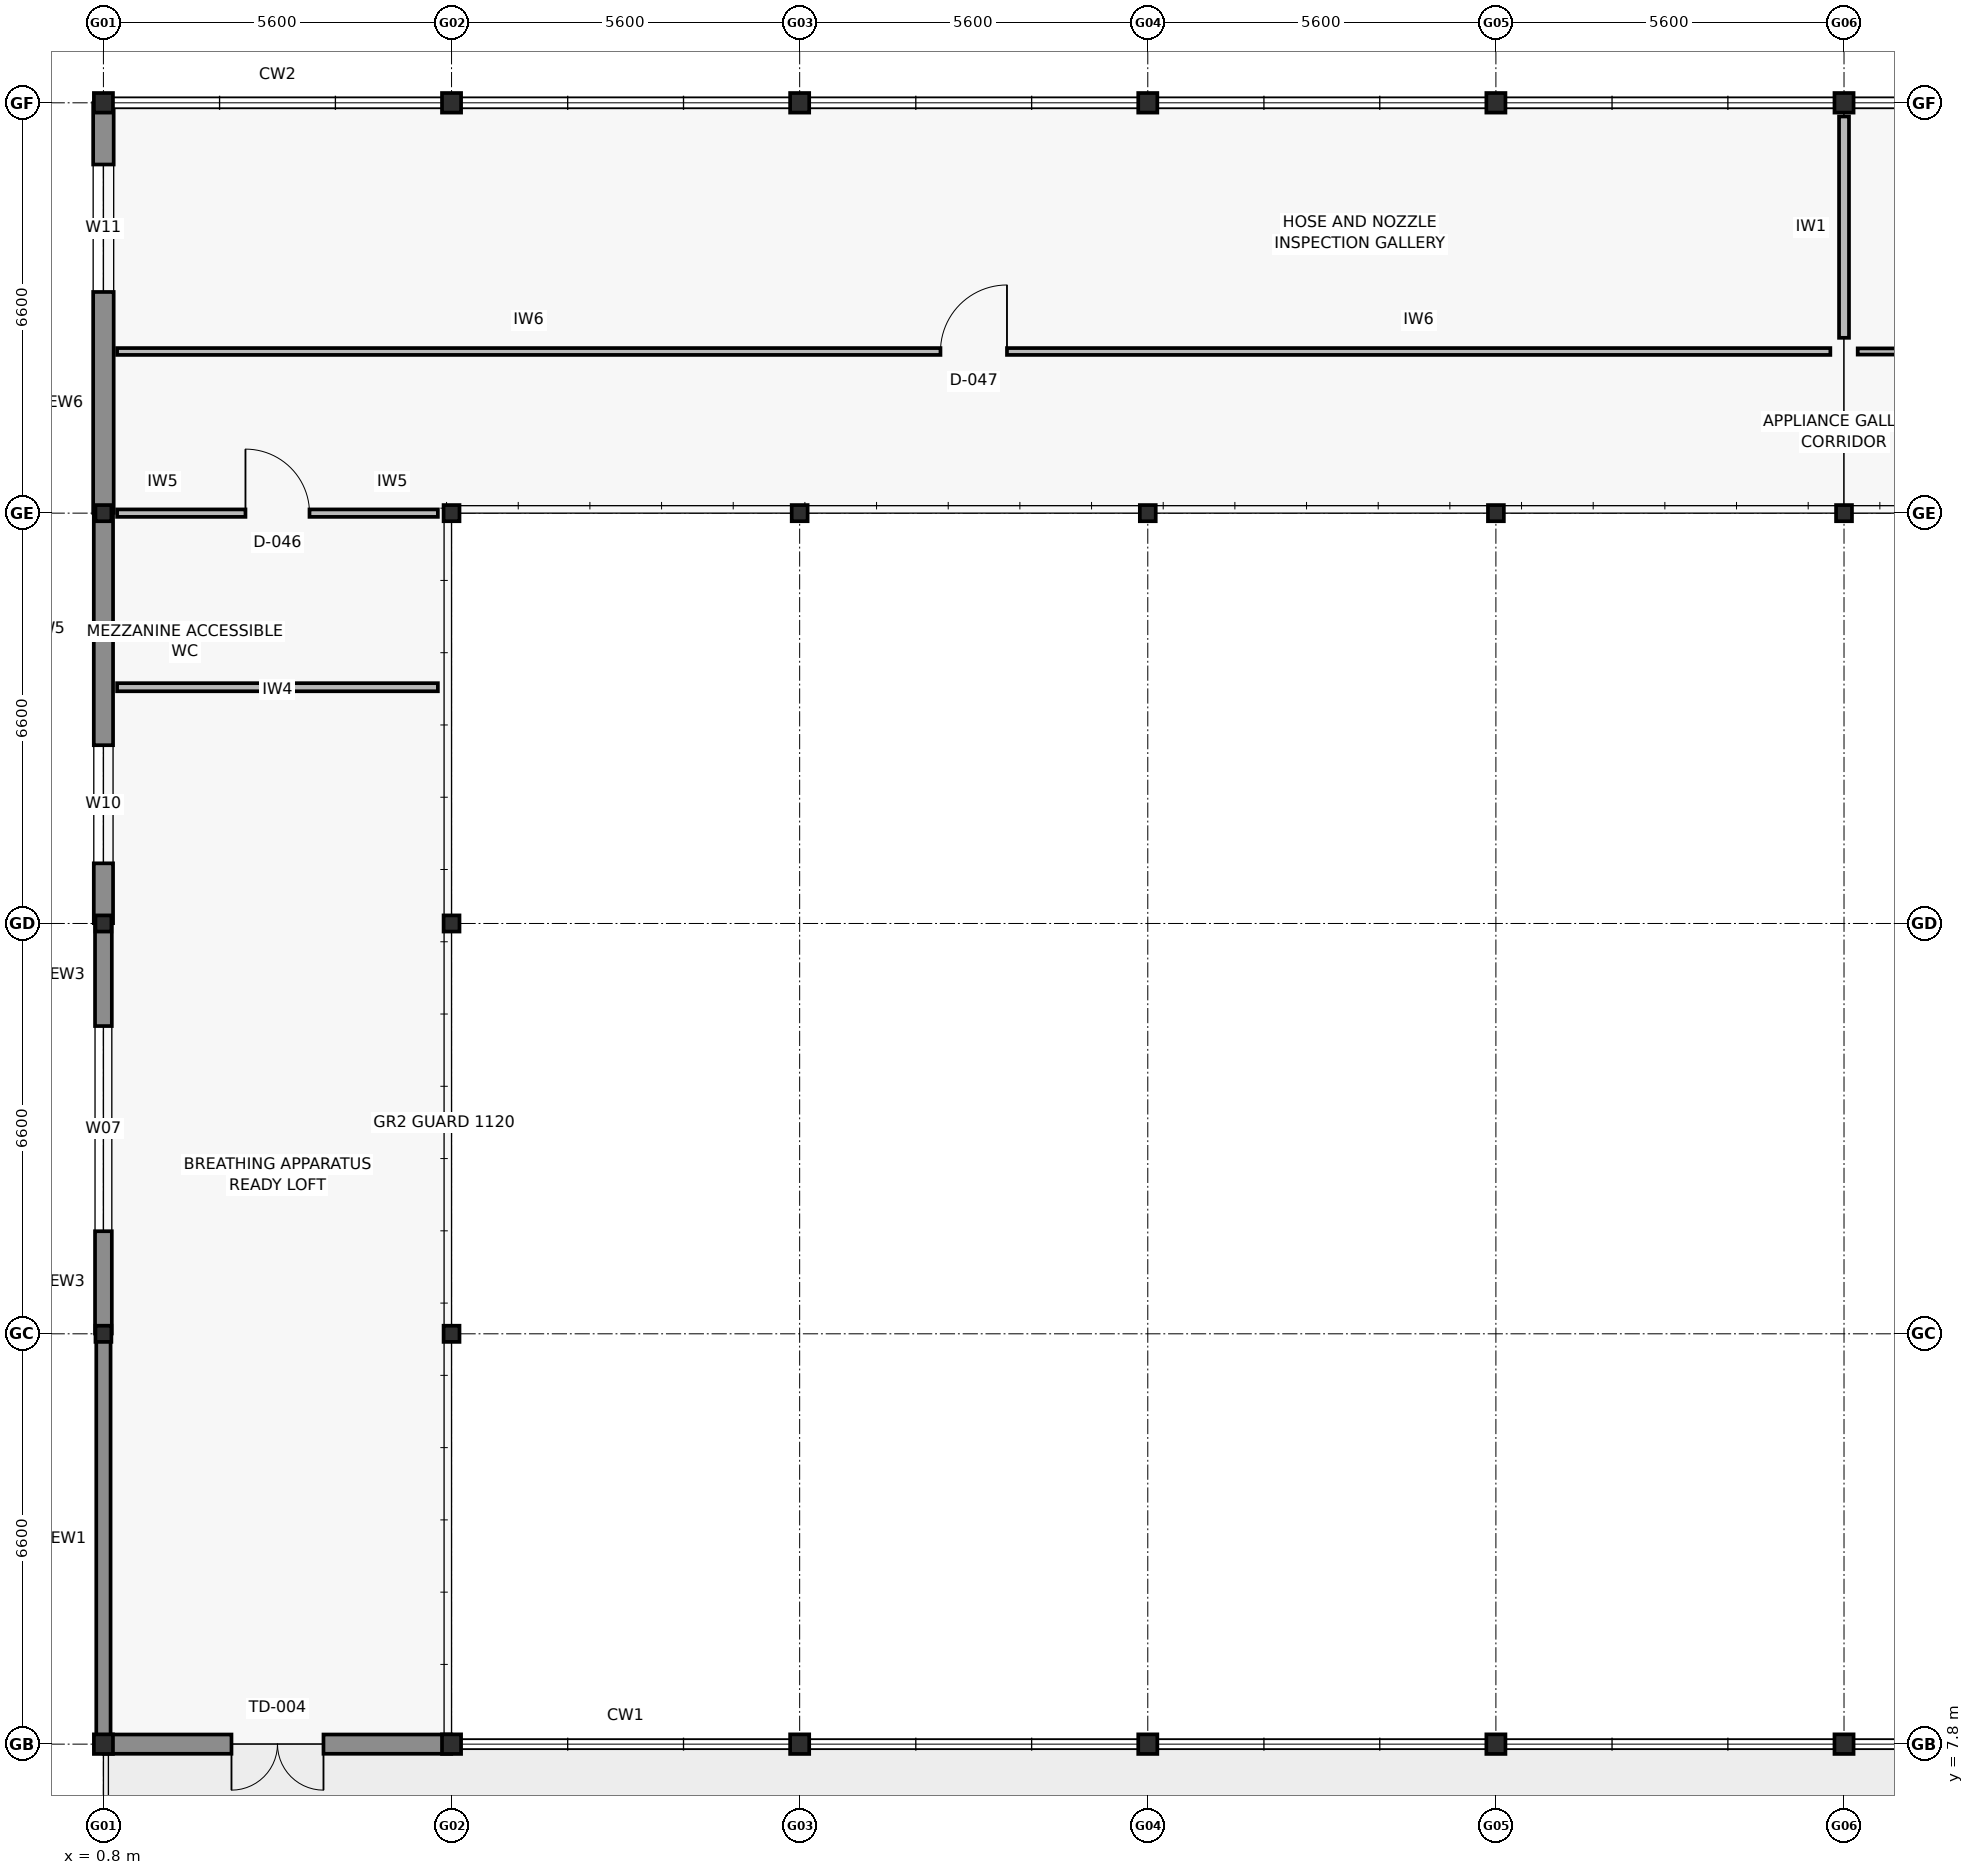
"""IFC4 building model, lengths in metres.
Left out: names, types, materials, properties, quantities, classifications, styles, units other than length and angle.
Written with IfcOpenShell. Run it as: python <this file> out.ifc"""

import sys

from ifc_helpers import new_model, si_unit, direction, frame, frame_2d, origin, origin_2d, place, context, subcontext, project, spatial, rectangle, i_section, extrude, element, fill, save


model = new_model("IFC4")
c1 = context("Model", 3, precision=1e-05, world=origin(), true_north=direction((0.0, 1.0)))
c2 = subcontext(c1, "Body", "Model", "MODEL_VIEW")
j1 = project(units=[si_unit("LENGTHUNIT", "METRE"), si_unit("PLANEANGLEUNIT", "RADIAN")], contexts=[c1])
p1 = place(None, origin())
s1 = spatial("IfcSite", under=j1, at=p1, CompositionType="ELEMENT")
p2 = place(p1, origin())
s2 = spatial("IfcBuilding", under=s1, at=p2, CompositionType="ELEMENT")
p3 = place(p2, frame((0.0, 0.0, 5.4)))
s3 = spatial("IfcBuildingStorey", under=s2, at=p3, CompositionType="ELEMENT", Elevation=5.4)
p4 = place(p3, frame((0.8, 7.8, 0.0), z_axis=(0.0, 0.0, 1.0), x_axis=(1.0, 0.0, 0.0)))
e1 = element("IfcColumn", 1, at=p4, inside=s3, PredefinedType="COLUMN", context=c2, shape_type="SweptSolid", body=[
    extrude(i_section(OverallWidth=0.307, OverallDepth=0.315, WebThickness=0.012, FlangeThickness=0.019, FilletRadius=0.017, at=origin_2d()), origin(), (0.0, 0.0, 1.0), 4.2),
])
for number, where, z_axis, x_axis in (
    (2, (0.8, 14.4, 0.0), (0.0, 0.0, 1.0), (1.0, 0.0, 0.0)),
    (3, (0.8, 21.0, 0.0), (0.0, 0.0, 1.0), (1.0, 0.0, 0.0)),
    (4, (0.8, 27.6, 0.0), (0.0, 0.0, 1.0), (1.0, 0.0, 0.0)),
):
    element("IfcColumn", number, at=place(p3, frame(where, z_axis=z_axis, x_axis=x_axis)), inside=s3, PredefinedType="COLUMN", context=c2, shape_type="SweptSolid", body=[
        extrude(i_section(OverallWidth=0.256, OverallDepth=0.26, WebThickness=0.01, FlangeThickness=0.017, FilletRadius=0.013, at=origin_2d()), origin(), (0.0, 0.0, 1.0), 4.2),
    ])
for number, where, z_axis, x_axis in (
    (5, (0.8, 34.2, 0.0), (0.0, 0.0, 1.0), (1.0, 0.0, 0.0)),
    (6, (6.4, 7.8, 0.0), (0.0, 0.0, 1.0), (1.0, 0.0, 0.0)),
):
    element("IfcColumn", number, at=place(p3, frame(where, z_axis=z_axis, x_axis=x_axis)), inside=s3, PredefinedType="COLUMN", context=c2, shape_type="SweptSolid", body=[
        extrude(i_section(OverallWidth=0.307, OverallDepth=0.315, WebThickness=0.012, FlangeThickness=0.019, FilletRadius=0.017, at=origin_2d()), origin(), (0.0, 0.0, 1.0), 4.2),
    ])
for number, where, z_axis, x_axis in (
    (7, (6.4, 14.4, 0.0), (0.0, 0.0, 1.0), (1.0, 0.0, 0.0)),
    (8, (6.4, 21.0, 0.0), (0.0, 0.0, 1.0), (1.0, 0.0, 0.0)),
    (9, (6.4, 27.6, 0.0), (0.0, 0.0, 1.0), (1.0, 0.0, 0.0)),
):
    element("IfcColumn", number, at=place(p3, frame(where, z_axis=z_axis, x_axis=x_axis)), inside=s3, PredefinedType="COLUMN", context=c2, shape_type="SweptSolid", body=[
        extrude(i_section(OverallWidth=0.256, OverallDepth=0.26, WebThickness=0.01, FlangeThickness=0.017, FilletRadius=0.013, at=origin_2d()), origin(), (0.0, 0.0, 1.0), 4.2),
    ])
for number, where, z_axis, x_axis in (
    (10, (6.4, 34.2, 0.0), (0.0, 0.0, 1.0), (1.0, 0.0, 0.0)),
    (11, (12.0, 7.8, 0.0), (0.0, 0.0, 1.0), (1.0, 0.0, 0.0)),
):
    element("IfcColumn", number, at=place(p3, frame(where, z_axis=z_axis, x_axis=x_axis)), inside=s3, PredefinedType="COLUMN", context=c2, shape_type="SweptSolid", body=[
        extrude(i_section(OverallWidth=0.307, OverallDepth=0.315, WebThickness=0.012, FlangeThickness=0.019, FilletRadius=0.017, at=origin_2d()), origin(), (0.0, 0.0, 1.0), 4.2),
    ])
p5 = place(p3, frame((12.0, 27.6, 0.0), z_axis=(0.0, 0.0, 1.0), x_axis=(1.0, 0.0, 0.0)))
e12 = element("IfcColumn", 12, at=p5, inside=s3, PredefinedType="COLUMN", context=c2, shape_type="SweptSolid", body=[
    extrude(i_section(OverallWidth=0.256, OverallDepth=0.26, WebThickness=0.01, FlangeThickness=0.017, FilletRadius=0.013, at=origin_2d()), origin(), (0.0, 0.0, 1.0), 4.2),
])
for number, where, z_axis, x_axis in (
    (13, (12.0, 34.2, 0.0), (0.0, 0.0, 1.0), (1.0, 0.0, 0.0)),
    (14, (17.6, 7.8, 0.0), (0.0, 0.0, 1.0), (1.0, 0.0, 0.0)),
):
    element("IfcColumn", number, at=place(p3, frame(where, z_axis=z_axis, x_axis=x_axis)), inside=s3, PredefinedType="COLUMN", context=c2, shape_type="SweptSolid", body=[
        extrude(i_section(OverallWidth=0.307, OverallDepth=0.315, WebThickness=0.012, FlangeThickness=0.019, FilletRadius=0.017, at=origin_2d()), origin(), (0.0, 0.0, 1.0), 4.2),
    ])
p6 = place(p3, frame((17.6, 27.6, 0.0), z_axis=(0.0, 0.0, 1.0), x_axis=(1.0, 0.0, 0.0)))
e15 = element("IfcColumn", 15, at=p6, inside=s3, PredefinedType="COLUMN", context=c2, shape_type="SweptSolid", body=[
    extrude(i_section(OverallWidth=0.256, OverallDepth=0.26, WebThickness=0.01, FlangeThickness=0.017, FilletRadius=0.013, at=origin_2d()), origin(), (0.0, 0.0, 1.0), 4.2),
])
for number, where, z_axis, x_axis in (
    (16, (17.6, 34.2, 0.0), (0.0, 0.0, 1.0), (1.0, 0.0, 0.0)),
    (17, (23.2, 7.8, 0.0), (0.0, 0.0, 1.0), (1.0, 0.0, 0.0)),
):
    element("IfcColumn", number, at=place(p3, frame(where, z_axis=z_axis, x_axis=x_axis)), inside=s3, PredefinedType="COLUMN", context=c2, shape_type="SweptSolid", body=[
        extrude(i_section(OverallWidth=0.307, OverallDepth=0.315, WebThickness=0.012, FlangeThickness=0.019, FilletRadius=0.017, at=origin_2d()), origin(), (0.0, 0.0, 1.0), 4.2),
    ])
p7 = place(p3, frame((23.2, 27.6, 0.0), z_axis=(0.0, 0.0, 1.0), x_axis=(1.0, 0.0, 0.0)))
e18 = element("IfcColumn", 18, at=p7, inside=s3, PredefinedType="COLUMN", context=c2, shape_type="SweptSolid", body=[
    extrude(i_section(OverallWidth=0.256, OverallDepth=0.26, WebThickness=0.01, FlangeThickness=0.017, FilletRadius=0.013, at=origin_2d()), origin(), (0.0, 0.0, 1.0), 4.2),
])
for number, where, z_axis, x_axis in (
    (19, (23.2, 34.2, 0.0), (0.0, 0.0, 1.0), (1.0, 0.0, 0.0)),
    (20, (28.8, 7.8, 0.0), (0.0, 0.0, 1.0), (1.0, 0.0, 0.0)),
):
    element("IfcColumn", number, at=place(p3, frame(where, z_axis=z_axis, x_axis=x_axis)), inside=s3, PredefinedType="COLUMN", context=c2, shape_type="SweptSolid", body=[
        extrude(i_section(OverallWidth=0.307, OverallDepth=0.315, WebThickness=0.012, FlangeThickness=0.019, FilletRadius=0.017, at=origin_2d()), origin(), (0.0, 0.0, 1.0), 4.2),
    ])
p8 = place(p3, frame((28.8, 27.6, 0.0), z_axis=(0.0, 0.0, 1.0), x_axis=(1.0, 0.0, 0.0)))
e21 = element("IfcColumn", 21, at=p8, inside=s3, PredefinedType="COLUMN", context=c2, shape_type="SweptSolid", body=[
    extrude(i_section(OverallWidth=0.256, OverallDepth=0.26, WebThickness=0.01, FlangeThickness=0.017, FilletRadius=0.013, at=origin_2d()), origin(), (0.0, 0.0, 1.0), 4.2),
])
p9 = place(p3, frame((28.8, 34.2, 0.0), z_axis=(0.0, 0.0, 1.0), x_axis=(1.0, 0.0, 0.0)))
e22 = element("IfcColumn", 22, at=p9, inside=s3, PredefinedType="COLUMN", context=c2, shape_type="SweptSolid", body=[
    extrude(i_section(OverallWidth=0.307, OverallDepth=0.315, WebThickness=0.012, FlangeThickness=0.019, FilletRadius=0.017, at=origin_2d()), origin(), (0.0, 0.0, 1.0), 4.2),
])
p10 = place(p3, frame((6.395, 7.8, 0.0), z_axis=(0.0, 0.0, 1.0), x_axis=(-1.0, 0.0, 0.0)))
e23 = element("IfcWall", 23, at=p10, inside=s3, PredefinedType="SOLIDWALL", context=c2, shape_type="SweptSolid", body=[
    extrude(rectangle(XDim=5.59, YDim=0.31, at=frame_2d((2.795, 0.0))), origin(), (0.0, 0.0, 1.0), 3.32),
])
p11 = place(p10, frame((2.055, 0.0, 0.0)))
e24 = element("IfcOpeningElement", 24, at=p11, cuts=e23, PredefinedType="OPENING", context=c2, shape_type="SweptSolid", body=[
    extrude(rectangle(XDim=1.48, YDim=2.16, at=frame_2d((0.74, 1.08))), frame((0.0, 0.165, 0.0), z_axis=(0.0, -1.0, 0.0), x_axis=(1.0, 0.0, 0.0)), (0.0, 0.0, 1.0), 0.33),
])
p12 = place(p3, frame((0.8, 7.805, 0.0), z_axis=(0.0, 0.0, 1.0), x_axis=(0.0, 1.0, 0.0)))
e25 = element("IfcWall", 25, at=p12, inside=s3, PredefinedType="SOLIDWALL", context=c2, shape_type="SweptSolid", body=[
    extrude(rectangle(XDim=6.59, YDim=0.23, at=frame_2d((3.295, 0.0))), origin(), (0.0, 0.0, 1.0), 3.32),
])
p13 = place(p3, frame((0.8, 14.405, 0.0), z_axis=(0.0, 0.0, 1.0), x_axis=(0.0, 1.0, 0.0)))
e26 = element("IfcWall", 26, at=p13, inside=s3, PredefinedType="SOLIDWALL", context=c2, shape_type="SweptSolid", body=[
    extrude(rectangle(XDim=6.59, YDim=0.27, at=frame_2d((3.295, 0.0))), origin(), (0.0, 0.0, 1.0), 3.32),
])
p14 = place(p13, frame((1.645, 0.0, 0.8)))
e27 = element("IfcOpeningElement", 27, at=p14, cuts=e26, PredefinedType="OPENING", context=c2, shape_type="SweptSolid", body=[
    extrude(rectangle(XDim=3.3, YDim=2.2, at=frame_2d((1.65, 1.1))), frame((0.0, 0.145, 0.0), z_axis=(0.0, -1.0, 0.0), x_axis=(1.0, 0.0, 0.0)), (0.0, 0.0, 1.0), 0.29),
])
p15 = place(p3, frame((0.8, 21.005, 0.0), z_axis=(0.0, 0.0, 1.0), x_axis=(0.0, 1.0, 0.0)))
e28 = element("IfcWall", 28, at=p15, inside=s3, PredefinedType="SOLIDWALL", context=c2, shape_type="SweptSolid", body=[
    extrude(rectangle(XDim=6.59, YDim=0.31, at=frame_2d((3.295, 0.0))), origin(), (0.0, 0.0, 1.0), 3.32),
])
p16 = place(p15, frame((0.962, 0.0, 0.8)))
e29 = element("IfcOpeningElement", 29, at=p16, cuts=e28, PredefinedType="OPENING", context=c2, shape_type="SweptSolid", body=[
    extrude(rectangle(XDim=1.9, YDim=1.8, at=frame_2d((0.95, 0.9))), frame((0.0, 0.165, 0.0), z_axis=(0.0, -1.0, 0.0), x_axis=(1.0, 0.0, 0.0)), (0.0, 0.0, 1.0), 0.33),
])
p17 = place(p3, frame((0.8, 27.605, 0.0), z_axis=(0.0, 0.0, 1.0), x_axis=(0.0, 1.0, 0.0)))
e30 = element("IfcWall", 30, at=p17, inside=s3, PredefinedType="SOLIDWALL", context=c2, shape_type="SweptSolid", body=[
    extrude(rectangle(XDim=6.59, YDim=0.33, at=frame_2d((3.295, 0.0))), origin(), (0.0, 0.0, 1.0), 3.32),
])
p18 = place(p17, frame((3.552, 0.0, 0.8)))
e31 = element("IfcOpeningElement", 31, at=p18, cuts=e30, PredefinedType="OPENING", context=c2, shape_type="SweptSolid", body=[
    extrude(rectangle(XDim=2.05, YDim=1.8, at=frame_2d((1.025, 0.9))), frame((0.0, 0.175, 0.0), z_axis=(0.0, -1.0, 0.0), x_axis=(1.0, 0.0, 0.0)), (0.0, 0.0, 1.0), 0.35),
])
p19 = place(p3, frame((1.02, 24.8, 0.0), z_axis=(0.0, 0.0, 1.0), x_axis=(1.0, 0.0, 0.0)))
e32 = element("IfcWall", 32, at=p19, inside=s3, PredefinedType="PARTITIONING", context=c2, shape_type="SweptSolid", body=[
    extrude(rectangle(XDim=5.16, YDim=0.13, at=frame_2d((2.58, 0.0))), origin(), (0.0, 0.0, 1.0), 3.3),
])
p20 = place(p3, frame((1.02, 27.6, 0.0), z_axis=(0.0, 0.0, 1.0), x_axis=(1.0, 0.0, 0.0)))
e33 = element("IfcWall", 33, at=p20, inside=s3, PredefinedType="PARTITIONING", context=c2, shape_type="SweptSolid", body=[
    extrude(rectangle(XDim=5.16, YDim=0.12, at=frame_2d((2.58, 0.0))), origin(), (0.0, 0.0, 1.0), 3.3),
])
p21 = place(p20, frame((2.065, 0.0, 0.0)))
e34 = element("IfcOpeningElement", 34, at=p21, cuts=e33, PredefinedType="OPENING", context=c2, shape_type="SweptSolid", body=[
    extrude(rectangle(XDim=1.03, YDim=2.06, at=frame_2d((0.515, 1.03))), frame((0.0, 0.07, 0.0), z_axis=(0.0, -1.0, 0.0), x_axis=(1.0, 0.0, 0.0)), (0.0, 0.0, 1.0), 0.14),
])
p22 = place(p3, frame((1.02, 30.2, 0.0), z_axis=(0.0, 0.0, 1.0), x_axis=(1.0, 0.0, 0.0)))
e35 = element("IfcWall", 35, at=p22, inside=s3, PredefinedType="PARTITIONING", context=c2, shape_type="SweptSolid", body=[
    extrude(rectangle(XDim=27.56, YDim=0.11, at=frame_2d((13.78, 0.0))), origin(), (0.0, 0.0, 1.0), 3.3),
])
p23 = place(p22, frame((13.245, 0.0, 0.0)))
e36 = element("IfcOpeningElement", 36, at=p23, cuts=e35, PredefinedType="OPENING", context=c2, shape_type="SweptSolid", body=[
    extrude(rectangle(XDim=1.07, YDim=2.08, at=frame_2d((0.535, 1.04))), frame((0.0, 0.065, 0.0), z_axis=(0.0, -1.0, 0.0), x_axis=(1.0, 0.0, 0.0)), (0.0, 0.0, 1.0), 0.13),
])
p24 = place(p3, frame((29.02, 30.2, 0.0), z_axis=(0.0, 0.0, 1.0), x_axis=(1.0, 0.0, 0.0)))
e37 = element("IfcWall", 37, at=p24, inside=s3, PredefinedType="PARTITIONING", context=c2, shape_type="SweptSolid", body=[
    extrude(rectangle(XDim=27.56, YDim=0.1, at=frame_2d((13.78, 0.0))), origin(), (0.0, 0.0, 1.0), 3.3),
])
p25 = place(p24, frame((13.225, 0.0, 0.0)))
e38 = element("IfcOpeningElement", 38, at=p25, cuts=e37, PredefinedType="OPENING", context=c2, shape_type="SweptSolid", body=[
    extrude(rectangle(XDim=1.11, YDim=2.1, at=frame_2d((0.555, 1.05))), frame((0.0, 0.06, 0.0), z_axis=(0.0, -1.0, 0.0), x_axis=(1.0, 0.0, 0.0)), (0.0, 0.0, 1.0), 0.12),
])
p26 = place(p3, frame((28.8, 30.42, 0.0), z_axis=(0.0, 0.0, 1.0), x_axis=(0.0, 1.0, 0.0)))
e39 = element("IfcWall", 39, at=p26, inside=s3, PredefinedType="PARTITIONING", context=c2, shape_type="SweptSolid", body=[
    extrude(rectangle(XDim=3.56, YDim=0.16, at=frame_2d((1.78, 0.0))), origin(), (0.0, 0.0, 1.0), 3.3),
])
p27 = place(p11, origin())
e40 = element("IfcDoor", 40, at=p27, inside=s3, OperationType="DOUBLE_DOOR_SINGLE_SWING", PredefinedType="DOOR", context=c2, shape_type="SweptSolid", body=[
    extrude(rectangle(XDim=1.48, YDim=2.16, at=frame_2d((0.74, 1.08))), frame((0.0, 0.025, 0.0), z_axis=(0.0, -1.0, 0.0), x_axis=(1.0, 0.0, 0.0)), (0.0, 0.0, 1.0), 0.05),
])
fill(e24, e40)
p28 = place(p14, origin())
e41 = element("IfcWindow", 41, at=p28, inside=s3, PartitioningType="TRIPLE_PANEL_VERTICAL", PredefinedType="WINDOW", context=c2, shape_type="SweptSolid", body=[
    extrude(rectangle(XDim=3.3, YDim=2.2, at=frame_2d((1.65, 1.1))), frame((0.0, 0.03, 0.0), z_axis=(0.0, -1.0, 0.0), x_axis=(1.0, 0.0, 0.0)), (0.0, 0.0, 1.0), 0.06),
])
fill(e27, e41)
p29 = place(p16, origin())
e42 = element("IfcWindow", 42, at=p29, inside=s3, PartitioningType="DOUBLE_PANEL_VERTICAL", PredefinedType="WINDOW", context=c2, shape_type="SweptSolid", body=[
    extrude(rectangle(XDim=1.9, YDim=1.8, at=frame_2d((0.95, 0.9))), frame((0.0, 0.03, 0.0), z_axis=(0.0, -1.0, 0.0), x_axis=(1.0, 0.0, 0.0)), (0.0, 0.0, 1.0), 0.06),
])
fill(e29, e42)
p30 = place(p18, origin())
e43 = element("IfcWindow", 43, at=p30, inside=s3, PartitioningType="DOUBLE_PANEL_VERTICAL", PredefinedType="WINDOW", context=c2, shape_type="SweptSolid", body=[
    extrude(rectangle(XDim=2.05, YDim=1.8, at=frame_2d((1.025, 0.9))), frame((0.0, 0.03, 0.0), z_axis=(0.0, -1.0, 0.0), x_axis=(1.0, 0.0, 0.0)), (0.0, 0.0, 1.0), 0.06),
])
fill(e31, e43)
p31 = place(p21, origin())
e44 = element("IfcDoor", 44, at=p31, inside=s3, OperationType="SINGLE_SWING_LEFT", PredefinedType="DOOR", context=c2, shape_type="SweptSolid", body=[
    extrude(rectangle(XDim=1.03, YDim=2.06, at=frame_2d((0.515, 1.03))), frame((0.0, 0.025, 0.0), z_axis=(0.0, -1.0, 0.0), x_axis=(1.0, 0.0, 0.0)), (0.0, 0.0, 1.0), 0.05),
])
fill(e34, e44)
p32 = place(p23, origin())
e45 = element("IfcDoor", 45, at=p32, inside=s3, OperationType="SINGLE_SWING_RIGHT", PredefinedType="DOOR", context=c2, shape_type="SweptSolid", body=[
    extrude(rectangle(XDim=1.07, YDim=2.08, at=frame_2d((0.535, 1.04))), frame((0.0, 0.025, 0.0), z_axis=(0.0, -1.0, 0.0), x_axis=(1.0, 0.0, 0.0)), (0.0, 0.0, 1.0), 0.05),
])
fill(e36, e45)
save(model, sys.argv[1])
